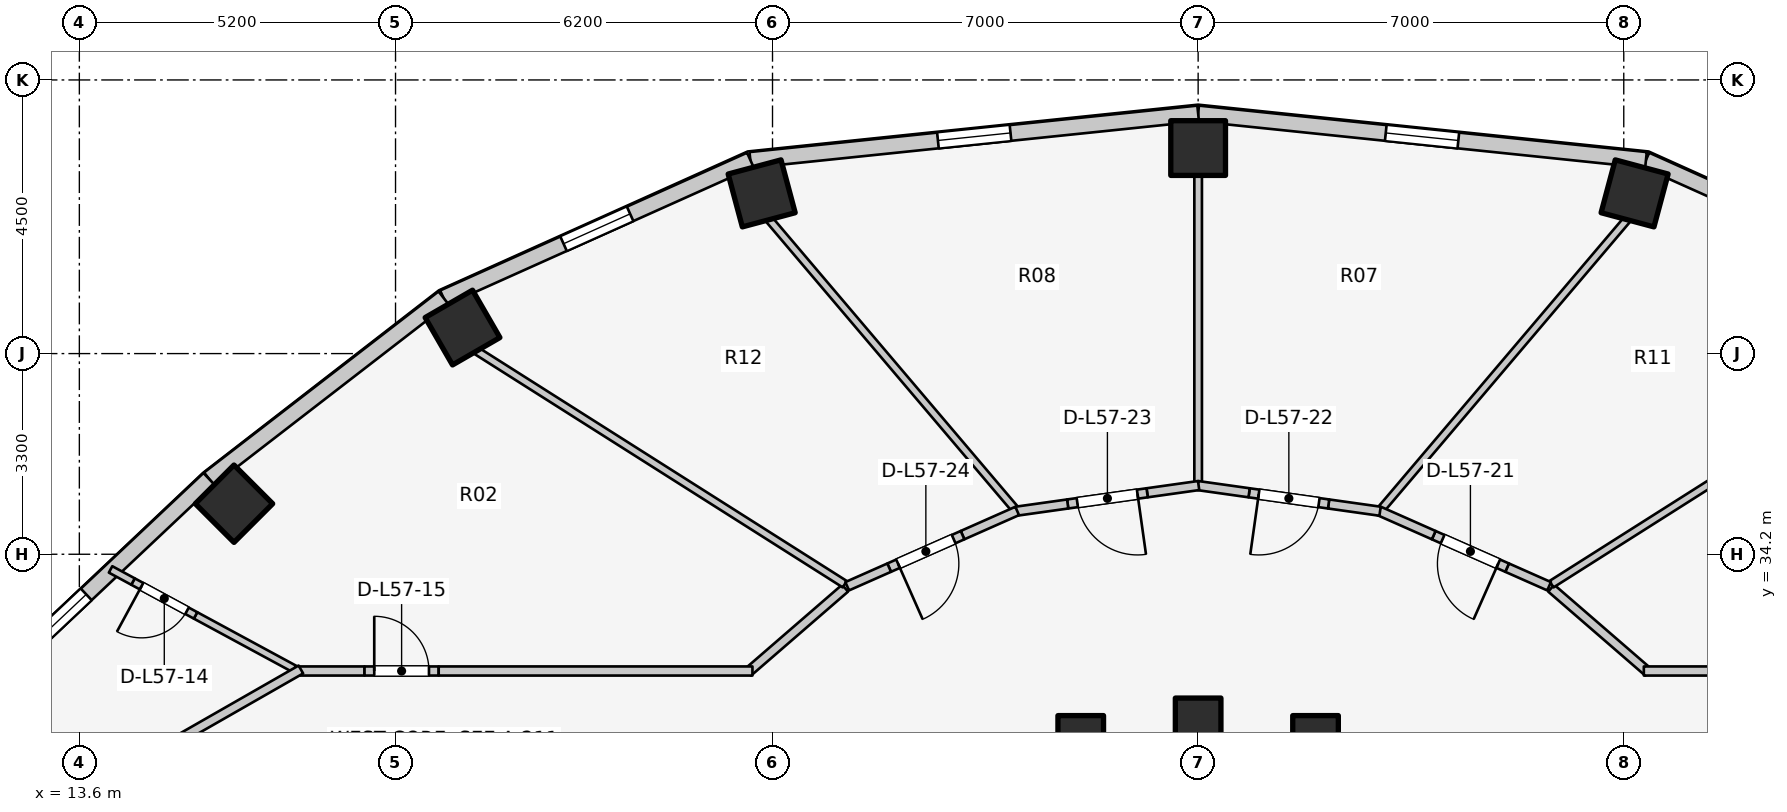
"""IFC4 building model, lengths in metres.
Left out: names, types, materials, properties, quantities, classifications, styles, units other than length and angle.
Written with IfcOpenShell. Run it as: python <this file> out.ifc"""

import sys

from ifc_helpers import new_model, si_unit, direction, frame, frame_2d, origin, origin_2d, place, context, subcontext, project, spatial, rectangle, extrude, element, fill, save


model = new_model("IFC4")
c1 = context("Model", 3, precision=1e-05, world=origin(), true_north=direction((0.0, 1.0)))
c2 = subcontext(c1, "Body", "Model", "MODEL_VIEW")
j1 = project(units=[si_unit("LENGTHUNIT", "METRE"), si_unit("PLANEANGLEUNIT", "RADIAN")], contexts=[c1])
p1 = place(None, origin())
s1 = spatial("IfcSite", under=j1, at=p1, CompositionType="ELEMENT")
p2 = place(p1, origin())
s2 = spatial("IfcBuilding", under=s1, at=p2, CompositionType="ELEMENT")
p3 = place(p2, frame((0.0, 0.0, 187.0)))
s3 = spatial("IfcBuildingStorey", under=s2, at=p3, CompositionType="ELEMENT", Elevation=187.0)
p4 = place(p3, frame((33.931, 31.172, 0.0), z_axis=(0.0, 0.0, 1.0), x_axis=(1.0, 0.0, 0.0)))
e1 = element("IfcColumn", 1, at=p4, inside=s3, PredefinedType="COLUMN", context=c2, shape_type="SweptSolid", body=[
    extrude(rectangle(XDim=0.75, YDim=0.75, at=origin_2d()), origin(), (0.0, 0.0, 1.0), 3.1),
])
p5 = place(p3, frame((39.178, 40.135, 0.0), z_axis=(0.0, 0.0, 1.0), x_axis=(0.258819045103, 0.965925826289, 0.0)))
e2 = element("IfcColumn", 2, at=p5, inside=s3, PredefinedType="COLUMN", context=c2, shape_type="SweptSolid", body=[
    extrude(rectangle(XDim=0.9, YDim=0.9, at=origin_2d()), origin(), (0.0, 0.0, 1.0), 3.1),
])
p6 = place(p3, frame((32.0, 31.46, 0.0), z_axis=(0.0, 0.0, 1.0), x_axis=(1.0, 0.0, 0.0)))
e3 = element("IfcColumn", 3, at=p6, inside=s3, PredefinedType="COLUMN", context=c2, shape_type="SweptSolid", body=[
    extrude(rectangle(XDim=0.75, YDim=0.75, at=origin_2d()), origin(), (0.0, 0.0, 1.0), 3.1),
])
p7 = place(p3, frame((32.0, 40.88, 0.0), z_axis=(0.0, 0.0, 1.0), x_axis=(0.0, 1.0, 0.0)))
e4 = element("IfcColumn", 4, at=p7, inside=s3, PredefinedType="COLUMN", context=c2, shape_type="SweptSolid", body=[
    extrude(rectangle(XDim=0.9, YDim=0.9, at=origin_2d()), origin(), (0.0, 0.0, 1.0), 3.1),
])
p8 = place(p3, frame((30.069, 31.172, 0.0), z_axis=(0.0, 0.0, 1.0), x_axis=(1.0, 0.0, 0.0)))
e5 = element("IfcColumn", 5, at=p8, inside=s3, PredefinedType="COLUMN", context=c2, shape_type="SweptSolid", body=[
    extrude(rectangle(XDim=0.75, YDim=0.75, at=origin_2d()), origin(), (0.0, 0.0, 1.0), 3.1),
])
for number, where, z_axis, x_axis in (
    (6, (24.822, 40.135, 0.0), (0.0, 0.0, 1.0), (-0.259, 0.966, 0.0)),
    (7, (19.902, 37.928, 0.0), (0.0, 0.0, 1.0), (-0.5, 0.866, 0.0)),
    (8, (16.143, 35.031, 0.0), (0.0, 0.0, 1.0), (-0.707, 0.707, 0.0)),
):
    element("IfcColumn", number, at=place(p3, frame(where, z_axis=z_axis, x_axis=x_axis)), inside=s3, PredefinedType="COLUMN", context=c2, shape_type="SweptSolid", body=[
        extrude(rectangle(XDim=0.9, YDim=0.9, at=origin_2d()), origin(), (0.0, 0.0, 1.0), 3.1),
    ])
p9 = place(p3, frame((44.413, 38.419, 0.0), z_axis=(0.0, 0.0, 1.0), x_axis=(-0.912353637112, 0.409403029847, 0.0)))
e9 = element("IfcWall", 9, at=p9, inside=s3, PredefinedType="STANDARD", context=c2, shape_type="SweptSolid", body=[
    extrude(rectangle(XDim=5.533, YDim=0.26, at=frame_2d((2.766, 0.0))), origin(), (0.0, 0.0, 1.0), 1.22),
])
p10 = place(p9, frame((2.167, 0.0, 0.15)))
e10 = element("IfcOpeningElement", 10, at=p10, cuts=e9, PredefinedType="OPENING", context=c2, shape_type="SweptSolid", body=[
    extrude(rectangle(XDim=1.2, YDim=0.9, at=frame_2d((0.6, 0.45))), frame((0.0, 0.14, 0.0), z_axis=(0.0, -1.0, 0.0), x_axis=(1.0, 0.0, 0.0)), (0.0, 0.0, 1.0), 0.28),
])
p11 = place(p3, frame((39.365, 40.685, 0.0), z_axis=(0.0, 0.0, 1.0), x_axis=(-0.994664178965, 0.10316574569, 0.0)))
e11 = element("IfcWall", 11, at=p11, inside=s3, PredefinedType="STANDARD", context=c2, shape_type="SweptSolid", body=[
    extrude(rectangle(XDim=7.405, YDim=0.26, at=frame_2d((3.702, 0.0))), origin(), (0.0, 0.0, 1.0), 1.22),
])
p12 = place(p11, frame((3.102, 0.0, 0.15)))
e12 = element("IfcOpeningElement", 12, at=p12, cuts=e11, PredefinedType="OPENING", context=c2, shape_type="SweptSolid", body=[
    extrude(rectangle(XDim=1.2, YDim=0.9, at=frame_2d((0.6, 0.45))), frame((0.0, 0.14, 0.0), z_axis=(0.0, -1.0, 0.0), x_axis=(1.0, 0.0, 0.0)), (0.0, 0.0, 1.0), 0.28),
])
p13 = place(p3, frame((32.0, 41.448, 0.0), z_axis=(0.0, 0.0, 1.0), x_axis=(-0.994664178965, -0.10316574569, 0.0)))
e13 = element("IfcWall", 13, at=p13, inside=s3, PredefinedType="STANDARD", context=c2, shape_type="SweptSolid", body=[
    extrude(rectangle(XDim=7.405, YDim=0.26, at=frame_2d((3.702, 0.0))), origin(), (0.0, 0.0, 1.0), 1.22),
])
p14 = place(p13, frame((3.102, 0.0, 0.15)))
e14 = element("IfcOpeningElement", 14, at=p14, cuts=e13, PredefinedType="OPENING", context=c2, shape_type="SweptSolid", body=[
    extrude(rectangle(XDim=1.2, YDim=0.9, at=frame_2d((0.6, 0.45))), frame((0.0, 0.14, 0.0), z_axis=(0.0, -1.0, 0.0), x_axis=(1.0, 0.0, 0.0)), (0.0, 0.0, 1.0), 0.28),
])
p15 = place(p3, frame((24.635, 40.685, 0.0), z_axis=(0.0, 0.0, 1.0), x_axis=(-0.912353637112, -0.409403029847, 0.0)))
e15 = element("IfcWall", 15, at=p15, inside=s3, PredefinedType="STANDARD", context=c2, shape_type="SweptSolid", body=[
    extrude(rectangle(XDim=5.533, YDim=0.26, at=frame_2d((2.766, 0.0))), origin(), (0.0, 0.0, 1.0), 1.22),
])
p16 = place(p15, frame((2.167, 0.0, 0.15)))
e16 = element("IfcOpeningElement", 16, at=p16, cuts=e15, PredefinedType="OPENING", context=c2, shape_type="SweptSolid", body=[
    extrude(rectangle(XDim=1.2, YDim=0.9, at=frame_2d((0.6, 0.45))), frame((0.0, 0.14, 0.0), z_axis=(0.0, -1.0, 0.0), x_axis=(1.0, 0.0, 0.0)), (0.0, 0.0, 1.0), 0.28),
])
p17 = place(p3, frame((19.587, 38.419, 0.0), z_axis=(0.0, 0.0, 1.0), x_axis=(-0.791460185804, -0.611220724687, 0.0)))
e17 = element("IfcWall", 17, at=p17, inside=s3, PredefinedType="STANDARD", context=c2, shape_type="SweptSolid", body=[
    extrude(rectangle(XDim=4.872, YDim=0.26, at=frame_2d((2.436, 0.0))), origin(), (0.0, 0.0, 1.0), 1.22),
])
p18 = place(p3, frame((15.731, 35.441, 0.0), z_axis=(0.0, 0.0, 1.0), x_axis=(-0.727667301037, -0.68593024354, 0.0)))
e18 = element("IfcWall", 18, at=p18, inside=s3, PredefinedType="STANDARD", context=c2, shape_type="SweptSolid", body=[
    extrude(rectangle(XDim=4.604, YDim=0.26, at=frame_2d((2.302, 0.0))), origin(), (0.0, 0.0, 1.0), 1.22),
])
p19 = place(p18, frame((2.772, 0.0, 0.15)))
e19 = element("IfcOpeningElement", 19, at=p19, cuts=e18, PredefinedType="OPENING", context=c2, shape_type="SweptSolid", body=[
    extrude(rectangle(XDim=1.2, YDim=0.9, at=frame_2d((0.6, 0.45))), frame((0.0, 0.14, 0.0), z_axis=(0.0, -1.0, 0.0), x_axis=(1.0, 0.0, 0.0)), (0.0, 0.0, 1.0), 0.28),
])
p20 = place(p3, frame((37.807, 33.642, 0.0), z_axis=(0.0, 0.0, 1.0), x_axis=(0.756055312247, -0.654507727092, 0.0)))
e20 = element("IfcWall", 20, at=p20, inside=s3, PredefinedType="PARTITIONING", context=c2, shape_type="SweptSolid", body=[
    extrude(rectangle(XDim=2.111, YDim=0.15, at=frame_2d((1.055, 0.0))), origin(), (0.0, 0.0, 1.0), 2.019),
])
p21 = place(p3, frame((39.33, 32.28, 0.0), z_axis=(0.0, 0.0, 1.0), x_axis=(1.0, 0.0, 0.0)))
e21 = element("IfcWall", 21, at=p21, inside=s3, PredefinedType="PARTITIONING", context=c2, shape_type="SweptSolid", body=[
    extrude(rectangle(XDim=5.06, YDim=0.15, at=frame_2d((2.53, 0.0))), origin(), (0.0, 0.0, 1.0), 2.019),
])
p22 = place(p3, frame((17.244, 32.256, 0.0), z_axis=(0.0, 0.0, 1.0), x_axis=(-0.879406539295, 0.476071568828, 0.0)))
e22 = element("IfcWall", 22, at=p22, inside=s3, PredefinedType="MOVABLE", context=c2, shape_type="SweptSolid", body=[
    extrude(rectangle(XDim=1.97, YDim=0.12, at=frame_2d((0.985, 0.0))), origin(), (0.0, 0.0, 1.0), 1.22),
])
p23 = place(p3, frame((15.511, 33.194, 0.0), z_axis=(0.0, 0.0, 1.0), x_axis=(-0.879342939039, 0.476189033433, 0.0)))
e23 = element("IfcWall", 23, at=p23, inside=s3, PredefinedType="MOVABLE", context=c2, shape_type="SweptSolid", body=[
    extrude(rectangle(XDim=1.17, YDim=0.12, at=frame_2d((0.585, 0.0))), origin(), (0.0, 0.0, 1.0), 2.11),
])
p24 = place(p23, frame((0.16, 0.0, 0.0)))
e24 = element("IfcOpeningElement", 24, at=p24, cuts=e23, PredefinedType="OPENING", context=c2, shape_type="SweptSolid", body=[
    extrude(rectangle(XDim=0.85, YDim=2.05, at=frame_2d((0.425, 1.025))), frame((0.0, 0.07, 0.0), z_axis=(0.0, -1.0, 0.0), x_axis=(1.0, 0.0, 0.0)), (0.0, 0.0, 1.0), 0.14),
])
p25 = place(p3, frame((14.482, 33.751, 0.0), z_axis=(0.0, 0.0, 1.0), x_axis=(-0.879403655312, 0.476076896125, 0.0)))
e25 = element("IfcWall", 25, at=p25, inside=s3, PredefinedType="MOVABLE", context=c2, shape_type="SweptSolid", body=[
    extrude(rectangle(XDim=0.419, YDim=0.12, at=frame_2d((0.21, 0.0))), origin(), (0.0, 0.0, 1.0), 2.575),
])
p26 = place(p3, frame((26.193, 33.642, 0.0), z_axis=(0.0, 0.0, 1.0), x_axis=(-0.756055312247, -0.654507727092, 0.0)))
e26 = element("IfcWall", 26, at=p26, inside=s3, PredefinedType="PARTITIONING", context=c2, shape_type="SweptSolid", body=[
    extrude(rectangle(XDim=2.111, YDim=0.15, at=frame_2d((1.055, 0.0))), origin(), (0.0, 0.0, 1.0), 2.019),
])
p27 = place(p3, frame((17.15, 32.28, 0.0), z_axis=(0.0, 0.0, 1.0), x_axis=(1.0, 0.0, 0.0)))
e27 = element("IfcWall", 27, at=p27, inside=s3, PredefinedType="PARTITIONING", context=c2, shape_type="SweptSolid", body=[
    extrude(rectangle(XDim=1.14, YDim=0.15, at=frame_2d((0.57, 0.0))), origin(), (0.0, 0.0, 1.0), 2.575),
])
p28 = place(p3, frame((18.29, 32.28, 0.0), z_axis=(0.0, 0.0, 1.0), x_axis=(1.0, 0.0, 0.0)))
e28 = element("IfcWall", 28, at=p28, inside=s3, PredefinedType="PARTITIONING", context=c2, shape_type="SweptSolid", body=[
    extrude(rectangle(XDim=1.22, YDim=0.15, at=frame_2d((0.61, 0.0))), origin(), (0.0, 0.0, 1.0), 2.575),
])
p29 = place(p28, frame((0.16, 0.0, 0.0)))
e29 = element("IfcOpeningElement", 29, at=p29, cuts=e28, PredefinedType="OPENING", context=c2, shape_type="SweptSolid", body=[
    extrude(rectangle(XDim=0.9, YDim=2.1, at=frame_2d((0.45, 1.05))), frame((0.0, 0.085, 0.0), z_axis=(0.0, -1.0, 0.0), x_axis=(1.0, 0.0, 0.0)), (0.0, 0.0, 1.0), 0.17),
])
p30 = place(p3, frame((19.51, 32.28, 0.0), z_axis=(0.0, 0.0, 1.0), x_axis=(1.0, 0.0, 0.0)))
e30 = element("IfcWall", 30, at=p30, inside=s3, PredefinedType="PARTITIONING", context=c2, shape_type="SweptSolid", body=[
    extrude(rectangle(XDim=5.16, YDim=0.15, at=frame_2d((2.58, 0.0))), origin(), (0.0, 0.0, 1.0), 2.019),
])
p31 = place(p3, frame((17.243, 32.305, 0.0), z_axis=(0.0, 0.0, 1.0), x_axis=(-0.867991349648, -0.496579315857, 0.0)))
e31 = element("IfcWall", 31, at=p31, inside=s3, PredefinedType="PARTITIONING", context=c2, shape_type="SweptSolid", body=[
    extrude(rectangle(XDim=2.567, YDim=0.15, at=frame_2d((1.283, 0.0))), origin(), (0.0, 0.0, 1.0), 1.22),
])
p32 = place(p3, frame((37.812, 33.708, 0.0), z_axis=(0.0, 0.0, 1.0), x_axis=(0.844640430122, 0.535334048799, 0.0)))
e32 = element("IfcWall", 32, at=p32, inside=s3, PredefinedType="PARTITIONING", context=c2, shape_type="SweptSolid", body=[
    extrude(rectangle(XDim=7.188, YDim=0.125, at=frame_2d((3.594, 0.0))), origin(), (0.0, 0.0, 1.0), 1.22),
])
p33 = place(p3, frame((35.02, 34.952, 0.0), z_axis=(0.0, 0.0, 1.0), x_axis=(0.647173462792, 0.762342776615, 0.0)))
e33 = element("IfcWall", 33, at=p33, inside=s3, PredefinedType="PARTITIONING", context=c2, shape_type="SweptSolid", body=[
    extrude(rectangle(XDim=6.253, YDim=0.125, at=frame_2d((3.127, 0.0))), origin(), (0.0, 0.0, 1.0), 1.22),
])
p34 = place(p3, frame((32.0, 35.385, 0.0), z_axis=(0.0, 0.0, 1.0), x_axis=(0.0, 1.0, 0.0)))
e34 = element("IfcWall", 34, at=p34, inside=s3, PredefinedType="PARTITIONING", context=c2, shape_type="SweptSolid", body=[
    extrude(rectangle(XDim=5.065, YDim=0.125, at=frame_2d((2.532, 0.0))), origin(), (0.0, 0.0, 1.0), 1.22),
])
p35 = place(p3, frame((28.98, 34.952, 0.0), z_axis=(0.0, 0.0, 1.0), x_axis=(-0.647173462792, 0.762342776615, 0.0)))
e35 = element("IfcWall", 35, at=p35, inside=s3, PredefinedType="PARTITIONING", context=c2, shape_type="SweptSolid", body=[
    extrude(rectangle(XDim=6.253, YDim=0.125, at=frame_2d((3.127, 0.0))), origin(), (0.0, 0.0, 1.0), 1.22),
])
p36 = place(p3, frame((26.188, 33.708, 0.0), z_axis=(0.0, 0.0, 1.0), x_axis=(-0.844640430122, 0.535334048799, 0.0)))
e36 = element("IfcWall", 36, at=p36, inside=s3, PredefinedType="PARTITIONING", context=c2, shape_type="SweptSolid", body=[
    extrude(rectangle(XDim=7.188, YDim=0.125, at=frame_2d((3.594, 0.0))), origin(), (0.0, 0.0, 1.0), 1.22),
])
p37 = place(p3, frame((37.772, 33.674, 0.0), z_axis=(0.0, 0.0, 1.0), x_axis=(-0.914277556503, 0.405088323302, 0.0)))
e37 = element("IfcWall", 37, at=p37, inside=s3, PredefinedType="PARTITIONING", context=c2, shape_type="SweptSolid", body=[
    extrude(rectangle(XDim=0.755, YDim=0.15, at=frame_2d((0.377, 0.0))), origin(), (0.0, 0.0, 1.0), 2.575),
])
p38 = place(p3, frame((37.082, 33.98, 0.0), z_axis=(0.0, 0.0, 1.0), x_axis=(-0.914382646268, 0.404851054345, 0.0)))
e38 = element("IfcWall", 38, at=p38, inside=s3, PredefinedType="PARTITIONING", context=c2, shape_type="SweptSolid", body=[
    extrude(rectangle(XDim=1.32, YDim=0.15, at=frame_2d((0.66, 0.0))), origin(), (0.0, 0.0, 1.0), 2.16),
])
p39 = place(p38, frame((0.16, 0.0, 0.0)))
e39 = element("IfcOpeningElement", 39, at=p39, cuts=e38, PredefinedType="OPENING", context=c2, shape_type="SweptSolid", body=[
    extrude(rectangle(XDim=1.0, YDim=2.1, at=frame_2d((0.5, 1.05))), frame((0.0, 0.085, 0.0), z_axis=(0.0, -1.0, 0.0), x_axis=(1.0, 0.0, 0.0)), (0.0, 0.0, 1.0), 0.17),
])
p40 = place(p3, frame((35.875, 34.514, 0.0), z_axis=(0.0, 0.0, 1.0), x_axis=(-0.914282340715, 0.405077525242, 0.0)))
e40 = element("IfcWall", 40, at=p40, inside=s3, PredefinedType="PARTITIONING", context=c2, shape_type="SweptSolid", body=[
    extrude(rectangle(XDim=0.982, YDim=0.15, at=frame_2d((0.491, 0.0))), origin(), (0.0, 0.0, 1.0), 2.019),
])
p41 = place(p3, frame((34.992, 34.908, 0.0), z_axis=(0.0, 0.0, 1.0), x_axis=(-0.990238723834, 0.139381741342, 0.0)))
e41 = element("IfcWall", 41, at=p41, inside=s3, PredefinedType="PARTITIONING", context=c2, shape_type="SweptSolid", body=[
    extrude(rectangle(XDim=0.855, YDim=0.15, at=frame_2d((0.427, 0.0))), origin(), (0.0, 0.0, 1.0), 2.575),
])
p42 = place(p3, frame((34.146, 35.027, 0.0), z_axis=(0.0, 0.0, 1.0), x_axis=(-0.990254187593, 0.139271834751, 0.0)))
e42 = element("IfcWall", 42, at=p42, inside=s3, PredefinedType="PARTITIONING", context=c2, shape_type="SweptSolid", body=[
    extrude(rectangle(XDim=1.32, YDim=0.15, at=frame_2d((0.66, 0.0))), origin(), (0.0, 0.0, 1.0), 2.575),
])
p43 = place(p42, frame((0.16, 0.0, 0.0)))
e43 = element("IfcOpeningElement", 43, at=p43, cuts=e42, PredefinedType="OPENING", context=c2, shape_type="SweptSolid", body=[
    extrude(rectangle(XDim=1.0, YDim=2.1, at=frame_2d((0.5, 1.05))), frame((0.0, 0.085, 0.0), z_axis=(0.0, -1.0, 0.0), x_axis=(1.0, 0.0, 0.0)), (0.0, 0.0, 1.0), 0.17),
])
for number, where, z_axis, x_axis in (
    (44, (32.838, 35.211, 0.0), (0.0, 0.0, 1.0), (-0.99, 0.14, 0.0)),
    (45, (32.008, 35.33, 0.0), (0.0, 0.0, 1.0), (-0.99, -0.14, 0.0)),
):
    element("IfcWall", number, at=place(p3, frame(where, z_axis=z_axis, x_axis=x_axis)), inside=s3, PredefinedType="PARTITIONING", context=c2, shape_type="SweptSolid", body=[
        extrude(rectangle(XDim=0.855, YDim=0.15, at=frame_2d((0.427, 0.0))), origin(), (0.0, 0.0, 1.0), 2.019),
    ])
p44 = place(p3, frame((31.162, 35.211, 0.0), z_axis=(0.0, 0.0, 1.0), x_axis=(-0.990254187593, -0.139271834751, 0.0)))
e46 = element("IfcWall", 46, at=p44, inside=s3, PredefinedType="PARTITIONING", context=c2, shape_type="SweptSolid", body=[
    extrude(rectangle(XDim=1.32, YDim=0.15, at=frame_2d((0.66, 0.0))), origin(), (0.0, 0.0, 1.0), 2.575),
])
p45 = place(p44, frame((0.16, 0.0, 0.0)))
e47 = element("IfcOpeningElement", 47, at=p45, cuts=e46, PredefinedType="OPENING", context=c2, shape_type="SweptSolid", body=[
    extrude(rectangle(XDim=1.0, YDim=2.1, at=frame_2d((0.5, 1.05))), frame((0.0, 0.085, 0.0), z_axis=(0.0, -1.0, 0.0), x_axis=(1.0, 0.0, 0.0)), (0.0, 0.0, 1.0), 0.17),
])
p46 = place(p3, frame((29.854, 35.027, 0.0), z_axis=(0.0, 0.0, 1.0), x_axis=(-0.990238723834, -0.139381741342, 0.0)))
e48 = element("IfcWall", 48, at=p46, inside=s3, PredefinedType="PARTITIONING", context=c2, shape_type="SweptSolid", body=[
    extrude(rectangle(XDim=0.855, YDim=0.15, at=frame_2d((0.427, 0.0))), origin(), (0.0, 0.0, 1.0), 2.575),
])
p47 = place(p3, frame((29.024, 34.912, 0.0), z_axis=(0.0, 0.0, 1.0), x_axis=(-0.914282340715, -0.405077525242, 0.0)))
e49 = element("IfcWall", 49, at=p47, inside=s3, PredefinedType="PARTITIONING", context=c2, shape_type="SweptSolid", body=[
    extrude(rectangle(XDim=0.982, YDim=0.15, at=frame_2d((0.491, 0.0))), origin(), (0.0, 0.0, 1.0), 2.019),
])
p48 = place(p3, frame((28.125, 34.514, 0.0), z_axis=(0.0, 0.0, 1.0), x_axis=(-0.914314172667, -0.405005671145, 0.0)))
e50 = element("IfcWall", 50, at=p48, inside=s3, PredefinedType="PARTITIONING", context=c2, shape_type="SweptSolid", body=[
    extrude(rectangle(XDim=1.32, YDim=0.15, at=frame_2d((0.66, 0.0))), origin(), (0.0, 0.0, 1.0), 2.16),
])
p49 = place(p48, frame((0.16, 0.0, 0.0)))
e51 = element("IfcOpeningElement", 51, at=p49, cuts=e50, PredefinedType="OPENING", context=c2, shape_type="SweptSolid", body=[
    extrude(rectangle(XDim=1.0, YDim=2.1, at=frame_2d((0.5, 1.05))), frame((0.0, 0.085, 0.0), z_axis=(0.0, -1.0, 0.0), x_axis=(1.0, 0.0, 0.0)), (0.0, 0.0, 1.0), 0.17),
])
p50 = place(p3, frame((26.918, 33.979, 0.0), z_axis=(0.0, 0.0, 1.0), x_axis=(-0.914397268697, -0.404818027019, 0.0)))
e52 = element("IfcWall", 52, at=p50, inside=s3, PredefinedType="PARTITIONING", context=c2, shape_type="SweptSolid", body=[
    extrude(rectangle(XDim=0.755, YDim=0.15, at=frame_2d((0.377, 0.0))), origin(), (0.0, 0.0, 1.0), 2.575),
])
p51 = place(p12, origin())
e53 = element("IfcWindow", 53, at=p51, inside=s3, PartitioningType="SINGLE_PANEL", PredefinedType="WINDOW", context=c2, shape_type="SweptSolid", body=[
    extrude(rectangle(XDim=1.2, YDim=0.9, at=frame_2d((0.6, 0.45))), frame((0.0, 0.03, 0.0), z_axis=(0.0, -1.0, 0.0), x_axis=(1.0, 0.0, 0.0)), (0.0, 0.0, 1.0), 0.06),
])
fill(e12, e53)
p52 = place(p14, origin())
e54 = element("IfcWindow", 54, at=p52, inside=s3, PartitioningType="SINGLE_PANEL", PredefinedType="WINDOW", context=c2, shape_type="SweptSolid", body=[
    extrude(rectangle(XDim=1.2, YDim=0.9, at=frame_2d((0.6, 0.45))), frame((0.0, 0.03, 0.0), z_axis=(0.0, -1.0, 0.0), x_axis=(1.0, 0.0, 0.0)), (0.0, 0.0, 1.0), 0.06),
])
fill(e14, e54)
p53 = place(p16, origin())
e55 = element("IfcWindow", 55, at=p53, inside=s3, PartitioningType="SINGLE_PANEL", PredefinedType="WINDOW", context=c2, shape_type="SweptSolid", body=[
    extrude(rectangle(XDim=1.2, YDim=0.9, at=frame_2d((0.6, 0.45))), frame((0.0, 0.03, 0.0), z_axis=(0.0, -1.0, 0.0), x_axis=(1.0, 0.0, 0.0)), (0.0, 0.0, 1.0), 0.06),
])
fill(e16, e55)
p54 = place(p19, origin())
e56 = element("IfcWindow", 56, at=p54, inside=s3, PartitioningType="SINGLE_PANEL", PredefinedType="WINDOW", context=c2, shape_type="SweptSolid", body=[
    extrude(rectangle(XDim=1.2, YDim=0.9, at=frame_2d((0.6, 0.45))), frame((0.0, 0.03, 0.0), z_axis=(0.0, -1.0, 0.0), x_axis=(1.0, 0.0, 0.0)), (0.0, 0.0, 1.0), 0.06),
])
fill(e19, e56)
p55 = place(p24, origin())
e57 = element("IfcDoor", 57, at=p55, inside=s3, OperationType="SINGLE_SWING_RIGHT", PredefinedType="DOOR", context=c2, shape_type="SweptSolid", body=[
    extrude(rectangle(XDim=0.85, YDim=2.05, at=frame_2d((0.425, 1.025))), frame((0.0, 0.025, 0.0), z_axis=(0.0, -1.0, 0.0), x_axis=(1.0, 0.0, 0.0)), (0.0, 0.0, 1.0), 0.05),
])
fill(e24, e57)
p56 = place(p29, origin())
e58 = element("IfcDoor", 58, at=p56, inside=s3, OperationType="SINGLE_SWING_LEFT", PredefinedType="DOOR", context=c2, shape_type="SweptSolid", body=[
    extrude(rectangle(XDim=0.9, YDim=2.1, at=frame_2d((0.45, 1.05))), frame((0.0, 0.025, 0.0), z_axis=(0.0, -1.0, 0.0), x_axis=(1.0, 0.0, 0.0)), (0.0, 0.0, 1.0), 0.05),
])
fill(e29, e58)
p57 = place(p39, origin())
e59 = element("IfcDoor", 59, at=p57, inside=s3, OperationType="SINGLE_SWING_LEFT", PredefinedType="DOOR", context=c2, shape_type="SweptSolid", body=[
    extrude(rectangle(XDim=1.0, YDim=2.1, at=frame_2d((0.5, 1.05))), frame((0.0, 0.025, 0.0), z_axis=(0.0, -1.0, 0.0), x_axis=(1.0, 0.0, 0.0)), (0.0, 0.0, 1.0), 0.05),
])
fill(e39, e59)
p58 = place(p43, origin())
e60 = element("IfcDoor", 60, at=p58, inside=s3, OperationType="SINGLE_SWING_RIGHT", PredefinedType="DOOR", context=c2, shape_type="SweptSolid", body=[
    extrude(rectangle(XDim=1.0, YDim=2.1, at=frame_2d((0.5, 1.05))), frame((0.0, 0.025, 0.0), z_axis=(0.0, -1.0, 0.0), x_axis=(1.0, 0.0, 0.0)), (0.0, 0.0, 1.0), 0.05),
])
fill(e43, e60)
p59 = place(p45, origin())
e61 = element("IfcDoor", 61, at=p59, inside=s3, OperationType="SINGLE_SWING_LEFT", PredefinedType="DOOR", context=c2, shape_type="SweptSolid", body=[
    extrude(rectangle(XDim=1.0, YDim=2.1, at=frame_2d((0.5, 1.05))), frame((0.0, 0.025, 0.0), z_axis=(0.0, -1.0, 0.0), x_axis=(1.0, 0.0, 0.0)), (0.0, 0.0, 1.0), 0.05),
])
fill(e47, e61)
p60 = place(p49, origin())
e62 = element("IfcDoor", 62, at=p60, inside=s3, OperationType="SINGLE_SWING_RIGHT", PredefinedType="DOOR", context=c2, shape_type="SweptSolid", body=[
    extrude(rectangle(XDim=1.0, YDim=2.1, at=frame_2d((0.5, 1.05))), frame((0.0, 0.025, 0.0), z_axis=(0.0, -1.0, 0.0), x_axis=(1.0, 0.0, 0.0)), (0.0, 0.0, 1.0), 0.05),
])
fill(e51, e62)
save(model, sys.argv[1])
